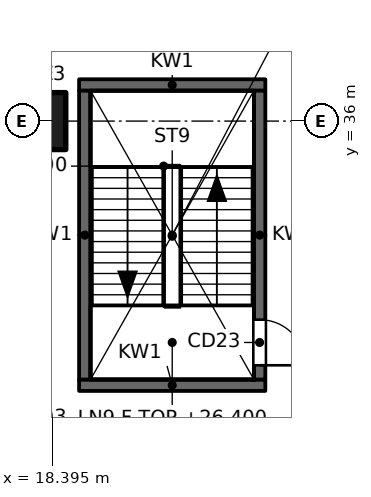
"""IFC4 building model, lengths in metres.
Left out: names, types, materials, properties, quantities, classifications, styles, units other than length and angle.
Written with IfcOpenShell. Run it as: python <this file> out.ifc"""

import sys

from ifc_helpers import new_model, si_unit, direction, frame, frame_2d, origin, origin_2d, place, context, subcontext, project, spatial, rectangle, extrude, element, fill, save


model = new_model("IFC4")
c1 = context("Model", 3, precision=1e-05, world=origin(), true_north=direction((0.0, 1.0)))
c2 = subcontext(c1, "Body", "Model", "MODEL_VIEW")
j1 = project(units=[si_unit("LENGTHUNIT", "METRE"), si_unit("PLANEANGLEUNIT", "RADIAN")], contexts=[c1])
p1 = place(None, origin())
s1 = spatial("IfcSite", under=j1, at=p1, CompositionType="ELEMENT")
p2 = place(p1, origin())
s2 = spatial("IfcBuilding", under=s1, at=p2, CompositionType="ELEMENT")
p3 = place(p2, frame((0.0, 0.0, 26.4)))
s3 = spatial("IfcBuildingStorey", under=s2, at=p3, CompositionType="ELEMENT", Elevation=26.4)
p4 = place(p3, frame((18.0, 36.0, 0.0), z_axis=(0.0, 0.0, 1.0), x_axis=(1.0, 0.0, 0.0)))
e1 = element("IfcColumn", 1, at=p4, inside=s3, PredefinedType="COLUMN", context=c2, shape_type="SweptSolid", body=[
    extrude(rectangle(XDim=1.5, YDim=1.5, at=origin_2d()), origin(), (0.0, 0.0, 1.0), 4.8),
])
for number, where, z_axis, x_axis in (
    (2, (19.1, 29.05, -0.35), (0.0, 0.0, 1.0), (1.0, 0.0, 0.0)),
    (3, (19.1, 36.95, -0.35), (0.0, 0.0, 1.0), (1.0, 0.0, 0.0)),
):
    element("IfcWall", number, at=place(p3, frame(where, z_axis=z_axis, x_axis=x_axis)), inside=s3, PredefinedType="SOLIDWALL", context=c2, shape_type="SweptSolid", body=[
        extrude(rectangle(XDim=4.9, YDim=0.3, at=frame_2d((2.45, 0.0))), origin(), (0.0, 0.0, 1.0), 4.7),
    ])
p5 = place(p3, frame((19.25, 29.2, -0.35), z_axis=(0.0, 0.0, 1.0), x_axis=(0.0, 1.0, 0.0)))
e4 = element("IfcWall", 4, at=p5, inside=s3, PredefinedType="SOLIDWALL", context=c2, shape_type="SweptSolid", body=[
    extrude(rectangle(XDim=7.6, YDim=0.3, at=frame_2d((3.8, 0.0))), origin(), (0.0, 0.0, 1.0), 4.7),
])
p6 = place(p3, frame((23.85, 29.2, -0.35), z_axis=(0.0, 0.0, 1.0), x_axis=(0.0, 1.0, 0.0)))
e5 = element("IfcWall", 5, at=p6, inside=s3, PredefinedType="SOLIDWALL", context=c2, shape_type="SweptSolid", body=[
    extrude(rectangle(XDim=7.6, YDim=0.3, at=frame_2d((3.8, 0.0))), origin(), (0.0, 0.0, 1.0), 4.7),
])
p7 = place(p6, frame((0.375, 0.0, 0.35)))
e6 = element("IfcOpeningElement", 6, at=p7, cuts=e5, PredefinedType="OPENING", context=c2, shape_type="SweptSolid", body=[
    extrude(rectangle(XDim=1.2, YDim=2.1, at=frame_2d((0.6, 1.05))), frame((0.0, 0.15, 0.0), z_axis=(0.0, -1.0, 0.0), x_axis=(1.0, 0.0, 0.0)), (0.0, 0.0, 1.0), 0.3),
])
p8 = place(p7, frame((1.2, 0.0, 0.0), z_axis=(0.0, 0.0, 1.0), x_axis=(-1.0, 0.0, 0.0)))
e7 = element("IfcDoor", 7, at=p8, inside=s3, OperationType="SINGLE_SWING_RIGHT", PredefinedType="DOOR", context=c2, shape_type="SweptSolid", body=[
    extrude(rectangle(XDim=1.2, YDim=2.1, at=frame_2d((0.6, 1.05))), frame((0.0, 0.025, 0.0), z_axis=(0.0, -1.0, 0.0), x_axis=(1.0, 0.0, 0.0)), (0.0, 0.0, 1.0), 0.05),
])
fill(e6, e7)
save(model, sys.argv[1])
